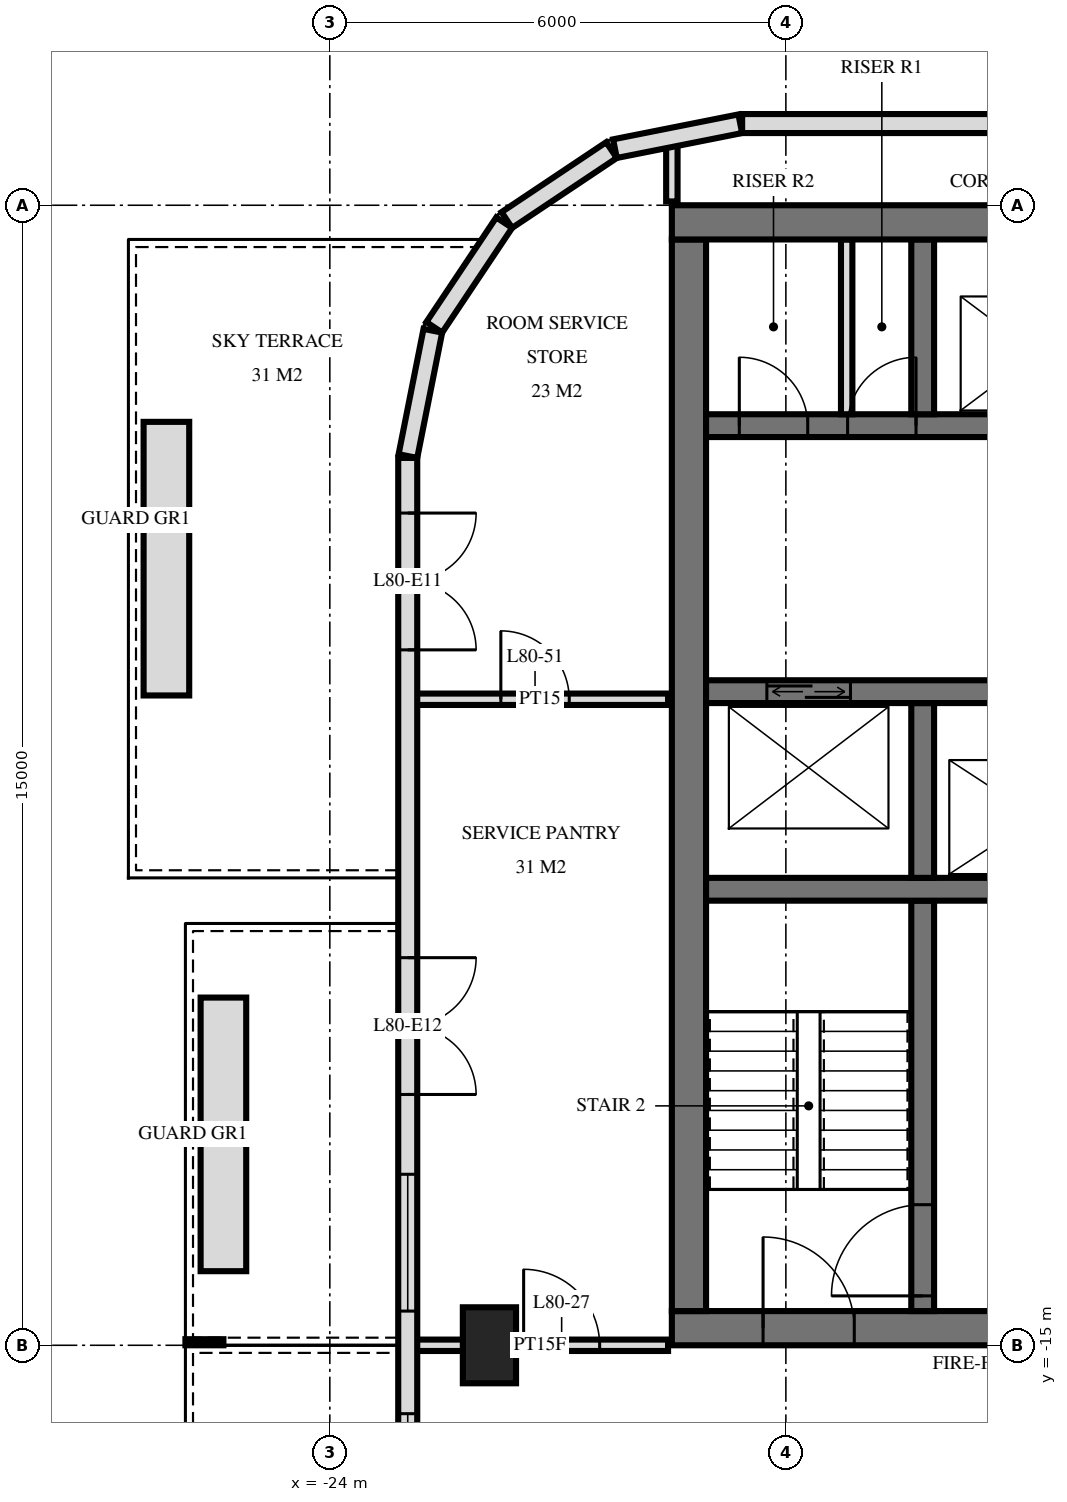
"""IFC4 building model, lengths in metres.
Left out: names, types, materials, properties, quantities, classifications, styles, units other than length and angle.
Written with IfcOpenShell. Run it as: python <this file> out.ifc"""

import sys

from ifc_helpers import new_model, si_unit, direction, frame, frame_2d, origin, origin_2d, place, context, subcontext, project, spatial, rectangle, extrude, element, fill, save


model = new_model("IFC4")
c1 = context("Model", 3, precision=1e-05, world=origin(), true_north=direction((0.0, 1.0)))
c2 = subcontext(c1, "Body", "Model", "MODEL_VIEW")
j1 = project(units=[si_unit("LENGTHUNIT", "METRE"), si_unit("PLANEANGLEUNIT", "RADIAN")], contexts=[c1])
p1 = place(None, origin())
s1 = spatial("IfcSite", under=j1, at=p1, CompositionType="ELEMENT")
p2 = place(p1, origin())
s2 = spatial("IfcBuilding", under=s1, at=p2, CompositionType="ELEMENT")
p3 = place(p2, frame((0.0, 0.0, 301.6)))
s3 = spatial("IfcBuildingStorey", under=s2, at=p3, CompositionType="ELEMENT", Elevation=301.6)
p4 = place(p3, frame((-21.9, -15.0, 0.0), z_axis=(0.0, 0.0, 1.0), x_axis=(0.0, 1.0, 0.0)))
e1 = element("IfcColumn", 1, at=p4, inside=s3, PredefinedType="COLUMN", context=c2, shape_type="SweptSolid", body=[
    extrude(rectangle(XDim=1.0, YDim=0.7, at=origin_2d()), origin(), (0.0, 0.0, 1.0), 3.5),
])
p5 = place(p3, frame((-19.5, -0.225, 0.0), z_axis=(0.0, 0.0, 1.0), x_axis=(1.0, 0.0, 0.0)))
e2 = element("IfcWall", 2, at=p5, inside=s3, PredefinedType="SHEAR", context=c2, shape_type="SweptSolid", body=[
    extrude(rectangle(XDim=9.5, YDim=0.45, at=frame_2d((4.75, 0.0))), origin(), (0.0, 0.0, 1.0), 3.5),
])
p6 = place(p3, frame((-19.5, -14.775, 0.0), z_axis=(0.0, 0.0, 1.0), x_axis=(1.0, 0.0, 0.0)))
e3 = element("IfcWall", 3, at=p6, inside=s3, PredefinedType="SHEAR", context=c2, shape_type="SweptSolid", body=[
    extrude(rectangle(XDim=9.5, YDim=0.45, at=frame_2d((4.75, 0.0))), origin(), (0.0, 0.0, 1.0), 3.5),
])
p7 = place(p6, frame((1.2, 0.0, 0.0)))
e4 = element("IfcOpeningElement", 4, at=p7, cuts=e3, PredefinedType="OPENING", context=c2, shape_type="SweptSolid", body=[
    extrude(rectangle(XDim=1.2, YDim=2.1, at=frame_2d((0.6, 1.05))), frame((0.0, 0.235, 0.0), z_axis=(0.0, -1.0, 0.0), x_axis=(1.0, 0.0, 0.0)), (0.0, 0.0, 1.0), 0.47),
])
p8 = place(p6, frame((4.25, 0.0, 0.0)))
e5 = element("IfcOpeningElement", 5, at=p8, cuts=e3, PredefinedType="OPENING", context=c2, shape_type="SweptSolid", body=[
    extrude(rectangle(XDim=1.1, YDim=2.1, at=frame_2d((0.55, 1.05))), frame((0.0, 0.235, 0.0), z_axis=(0.0, -1.0, 0.0), x_axis=(1.0, 0.0, 0.0)), (0.0, 0.0, 1.0), 0.47),
])
p9 = place(p3, frame((-19.275, -14.55, 0.0), z_axis=(0.0, 0.0, 1.0), x_axis=(0.0, 1.0, 0.0)))
e6 = element("IfcWall", 6, at=p9, inside=s3, PredefinedType="SHEAR", context=c2, shape_type="SweptSolid", body=[
    extrude(rectangle(XDim=14.1, YDim=0.45, at=frame_2d((7.05, 0.0))), origin(), (0.0, 0.0, 1.0), 3.5),
])
p10 = place(p3, frame((-19.05, -2.9, 0.0), z_axis=(0.0, 0.0, 1.0), x_axis=(1.0, 0.0, 0.0)))
e7 = element("IfcWall", 7, at=p10, inside=s3, PredefinedType="SHEAR", context=c2, shape_type="SweptSolid", body=[
    extrude(rectangle(XDim=8.7, YDim=0.3, at=frame_2d((4.35, 0.0))), origin(), (0.0, 0.0, 1.0), 3.5),
])
p11 = place(p10, frame((6.8, 0.0, 0.0)))
e8 = element("IfcOpeningElement", 8, at=p11, cuts=e7, PredefinedType="OPENING", context=c2, shape_type="SweptSolid", body=[
    extrude(rectangle(XDim=1.1, YDim=2.1, at=frame_2d((0.55, 1.05))), frame((0.0, 0.16, 0.0), z_axis=(0.0, -1.0, 0.0), x_axis=(1.0, 0.0, 0.0)), (0.0, 0.0, 1.0), 0.32),
])
p12 = place(p10, frame((3.8, 0.0, 0.0)))
e9 = element("IfcOpeningElement", 9, at=p12, cuts=e7, PredefinedType="OPENING", context=c2, shape_type="SweptSolid", body=[
    extrude(rectangle(XDim=1.1, YDim=2.1, at=frame_2d((0.55, 1.05))), frame((0.0, 0.16, 0.0), z_axis=(0.0, -1.0, 0.0), x_axis=(1.0, 0.0, 0.0)), (0.0, 0.0, 1.0), 0.32),
])
p13 = place(p10, frame((1.863, 0.0, 0.0)))
e10 = element("IfcOpeningElement", 10, at=p13, cuts=e7, PredefinedType="OPENING", context=c2, shape_type="SweptSolid", body=[
    extrude(rectangle(XDim=0.9, YDim=2.1, at=frame_2d((0.45, 1.05))), frame((0.0, 0.16, 0.0), z_axis=(0.0, -1.0, 0.0), x_axis=(1.0, 0.0, 0.0)), (0.0, 0.0, 1.0), 0.32),
])
p14 = place(p10, frame((0.438, 0.0, 0.0)))
e11 = element("IfcOpeningElement", 11, at=p14, cuts=e7, PredefinedType="OPENING", context=c2, shape_type="SweptSolid", body=[
    extrude(rectangle(XDim=0.9, YDim=2.1, at=frame_2d((0.45, 1.05))), frame((0.0, 0.16, 0.0), z_axis=(0.0, -1.0, 0.0), x_axis=(1.0, 0.0, 0.0)), (0.0, 0.0, 1.0), 0.32),
])
p15 = place(p3, frame((-19.05, -6.4, 0.0), z_axis=(0.0, 0.0, 1.0), x_axis=(1.0, 0.0, 0.0)))
e12 = element("IfcWall", 12, at=p15, inside=s3, PredefinedType="SHEAR", context=c2, shape_type="SweptSolid", body=[
    extrude(rectangle(XDim=8.7, YDim=0.3, at=frame_2d((4.35, 0.0))), origin(), (0.0, 0.0, 1.0), 3.5),
])
p16 = place(p15, frame((0.8, 0.0, 0.0)))
e13 = element("IfcOpeningElement", 13, at=p16, cuts=e12, PredefinedType="OPENING", context=c2, shape_type="SweptSolid", body=[
    extrude(rectangle(XDim=1.1, YDim=2.1, at=frame_2d((0.55, 1.05))), frame((0.0, 0.16, 0.0), z_axis=(0.0, -1.0, 0.0), x_axis=(1.0, 0.0, 0.0)), (0.0, 0.0, 1.0), 0.32),
])
p17 = place(p3, frame((-19.05, -9.0, 0.0), z_axis=(0.0, 0.0, 1.0), x_axis=(1.0, 0.0, 0.0)))
e14 = element("IfcWall", 14, at=p17, inside=s3, PredefinedType="SHEAR", context=c2, shape_type="SweptSolid", body=[
    extrude(rectangle(XDim=8.7, YDim=0.3, at=frame_2d((4.35, 0.0))), origin(), (0.0, 0.0, 1.0), 3.5),
])
p18 = place(p17, frame((3.8, 0.0, 0.0)))
e15 = element("IfcOpeningElement", 15, at=p18, cuts=e14, PredefinedType="OPENING", context=c2, shape_type="SweptSolid", body=[
    extrude(rectangle(XDim=1.1, YDim=2.1, at=frame_2d((0.55, 1.05))), frame((0.0, 0.16, 0.0), z_axis=(0.0, -1.0, 0.0), x_axis=(1.0, 0.0, 0.0)), (0.0, 0.0, 1.0), 0.32),
])
for number, where, z_axis, x_axis in (
    (16, (-16.2, -2.75, 0.0), (0.0, 0.0, 1.0), (0.0, 1.0, 0.0)),
    (17, (-16.2, -8.85, 0.0), (0.0, 0.0, 1.0), (0.0, 1.0, 0.0)),
):
    element("IfcWall", number, at=place(p3, frame(where, z_axis=z_axis, x_axis=x_axis)), inside=s3, PredefinedType="SHEAR", context=c2, shape_type="SweptSolid", body=[
        extrude(rectangle(XDim=2.3, YDim=0.3, at=frame_2d((1.15, 0.0))), origin(), (0.0, 0.0, 1.0), 3.5),
    ])
p19 = place(p3, frame((-16.2, -14.55, 0.0), z_axis=(0.0, 0.0, 1.0), x_axis=(0.0, 1.0, 0.0)))
e18 = element("IfcWall", 18, at=p19, inside=s3, PredefinedType="SHEAR", context=c2, shape_type="SweptSolid", body=[
    extrude(rectangle(XDim=5.4, YDim=0.3, at=frame_2d((2.7, 0.0))), origin(), (0.0, 0.0, 1.0), 3.5),
])
p20 = place(p19, frame((0.2, 0.0, 0.0)))
e19 = element("IfcOpeningElement", 19, at=p20, cuts=e18, PredefinedType="OPENING", context=c2, shape_type="SweptSolid", body=[
    extrude(rectangle(XDim=1.2, YDim=2.1, at=frame_2d((0.6, 1.05))), frame((0.0, 0.16, 0.0), z_axis=(0.0, -1.0, 0.0), x_axis=(1.0, 0.0, 0.0)), (0.0, 0.0, 1.0), 0.32),
])
p21 = place(p3, frame((18.575, 1.075, 0.0), z_axis=(0.0, 0.0, 1.0), x_axis=(-1.0, 0.0, 0.0)))
e20 = element("IfcWall", 20, at=p21, inside=s3, PredefinedType="SOLIDWALL", context=c2, shape_type="SweptSolid", body=[
    extrude(rectangle(XDim=37.151, YDim=0.25, at=frame_2d((18.575, 0.0))), origin(), (0.0, 0.0, 1.0), 3.22),
])
p22 = place(p21, frame((9.275, 0.0, 0.9)))
e21 = element("IfcOpeningElement", 21, at=p22, cuts=e20, PredefinedType="OPENING", context=c2, shape_type="SweptSolid", body=[
    extrude(rectangle(XDim=2.4, YDim=1.5, at=frame_2d((1.2, 0.75))), frame((0.0, 0.135, 0.0), z_axis=(0.0, -1.0, 0.0), x_axis=(1.0, 0.0, 0.0)), (0.0, 0.0, 1.0), 0.27),
])
p23 = place(p21, frame((12.275, 0.0, 0.9)))
e22 = element("IfcOpeningElement", 22, at=p23, cuts=e20, PredefinedType="OPENING", context=c2, shape_type="SweptSolid", body=[
    extrude(rectangle(XDim=2.4, YDim=1.5, at=frame_2d((1.2, 0.75))), frame((0.0, 0.135, 0.0), z_axis=(0.0, -1.0, 0.0), x_axis=(1.0, 0.0, 0.0)), (0.0, 0.0, 1.0), 0.27),
])
p24 = place(p21, frame((15.275, 0.0, 0.9)))
e23 = element("IfcOpeningElement", 23, at=p24, cuts=e20, PredefinedType="OPENING", context=c2, shape_type="SweptSolid", body=[
    extrude(rectangle(XDim=2.4, YDim=1.5, at=frame_2d((1.2, 0.75))), frame((0.0, 0.135, 0.0), z_axis=(0.0, -1.0, 0.0), x_axis=(1.0, 0.0, 0.0)), (0.0, 0.0, 1.0), 0.27),
])
p25 = place(p21, frame((25.375, 0.0, 0.9)))
e24 = element("IfcOpeningElement", 24, at=p25, cuts=e20, PredefinedType="OPENING", context=c2, shape_type="SweptSolid", body=[
    extrude(rectangle(XDim=2.4, YDim=1.5, at=frame_2d((1.2, 0.75))), frame((0.0, 0.135, 0.0), z_axis=(0.0, -1.0, 0.0), x_axis=(1.0, 0.0, 0.0)), (0.0, 0.0, 1.0), 0.27),
])
p26 = place(p3, frame((-18.6, 1.073, 0.0), z_axis=(0.0, 0.0, 1.0), x_axis=(-0.980797896849, -0.195026884138, 0.0)))
e25 = element("IfcWall", 25, at=p26, inside=s3, PredefinedType="SOLIDWALL", context=c2, shape_type="SweptSolid", body=[
    extrude(rectangle(XDim=1.681, YDim=0.25, at=frame_2d((0.841, 0.0))), origin(), (0.0, 0.0, 1.0), 3.22),
])
for number, where, z_axis, x_axis in (
    (26, (-20.294, 0.726, 0.0), (0.0, 0.0, 1.0), (-0.831, -0.556, 0.0)),
    (27, (-21.706, -0.229, 0.0), (0.0, 0.0, 1.0), (-0.556, -0.831, 0.0)),
):
    element("IfcWall", number, at=place(p3, frame(where, z_axis=z_axis, x_axis=x_axis)), inside=s3, PredefinedType="SOLIDWALL", context=c2, shape_type="SweptSolid", body=[
        extrude(rectangle(XDim=1.656, YDim=0.25, at=frame_2d((0.828, 0.0))), origin(), (0.0, 0.0, 1.0), 3.22),
    ])
p27 = place(p3, frame((-22.645, -1.651, 0.0), z_axis=(0.0, 0.0, 1.0), x_axis=(-0.19513878023, -0.980775640221, 0.0)))
e28 = element("IfcWall", 28, at=p27, inside=s3, PredefinedType="SOLIDWALL", context=c2, shape_type="SweptSolid", body=[
    extrude(rectangle(XDim=1.681, YDim=0.25, at=frame_2d((0.841, 0.0))), origin(), (0.0, 0.0, 1.0), 3.22),
])
p28 = place(p3, frame((-22.975, -3.325, 0.0), z_axis=(0.0, 0.0, 1.0), x_axis=(0.0, -1.0, 0.0)))
e29 = element("IfcWall", 29, at=p28, inside=s3, PredefinedType="SOLIDWALL", context=c2, shape_type="SweptSolid", body=[
    extrude(rectangle(XDim=25.951, YDim=0.25, at=frame_2d((12.975, 0.0))), origin(), (0.0, 0.0, 1.0), 3.22),
])
p29 = place(p28, frame((0.725, 0.0, 0.0)))
e30 = element("IfcOpeningElement", 30, at=p29, cuts=e29, PredefinedType="OPENING", context=c2, shape_type="SweptSolid", body=[
    extrude(rectangle(XDim=1.8, YDim=2.4, at=frame_2d((0.9, 1.2))), frame((0.0, 0.135, 0.0), z_axis=(0.0, -1.0, 0.0), x_axis=(1.0, 0.0, 0.0)), (0.0, 0.0, 1.0), 0.27),
])
p30 = place(p28, frame((6.575, 0.0, 0.0)))
e31 = element("IfcOpeningElement", 31, at=p30, cuts=e29, PredefinedType="OPENING", context=c2, shape_type="SweptSolid", body=[
    extrude(rectangle(XDim=1.8, YDim=2.4, at=frame_2d((0.9, 1.2))), frame((0.0, 0.135, 0.0), z_axis=(0.0, -1.0, 0.0), x_axis=(1.0, 0.0, 0.0)), (0.0, 0.0, 1.0), 0.27),
])
p31 = place(p28, frame((9.425, 0.0, 0.9)))
e32 = element("IfcOpeningElement", 32, at=p31, cuts=e29, PredefinedType="OPENING", context=c2, shape_type="SweptSolid", body=[
    extrude(rectangle(XDim=1.8, YDim=1.5, at=frame_2d((0.9, 0.75))), frame((0.0, 0.135, 0.0), z_axis=(0.0, -1.0, 0.0), x_axis=(1.0, 0.0, 0.0)), (0.0, 0.0, 1.0), 0.27),
])
p32 = place(p28, frame((12.575, 0.0, 0.9)))
e33 = element("IfcOpeningElement", 33, at=p32, cuts=e29, PredefinedType="OPENING", context=c2, shape_type="SweptSolid", body=[
    extrude(rectangle(XDim=1.2, YDim=1.5, at=frame_2d((0.6, 0.75))), frame((0.0, 0.135, 0.0), z_axis=(0.0, -1.0, 0.0), x_axis=(1.0, 0.0, 0.0)), (0.0, 0.0, 1.0), 0.27),
])
p33 = place(p28, frame((16.7, 0.0, 0.0)))
e34 = element("IfcOpeningElement", 34, at=p33, cuts=e29, PredefinedType="OPENING", context=c2, shape_type="SweptSolid", body=[
    extrude(rectangle(XDim=1.8, YDim=2.4, at=frame_2d((0.9, 1.2))), frame((0.0, 0.135, 0.0), z_axis=(0.0, -1.0, 0.0), x_axis=(1.0, 0.0, 0.0)), (0.0, 0.0, 1.0), 0.27),
])
p34 = place(p28, frame((22.25, 0.0, 0.0)))
e35 = element("IfcOpeningElement", 35, at=p34, cuts=e29, PredefinedType="OPENING", context=c2, shape_type="SweptSolid", body=[
    extrude(rectangle(XDim=1.8, YDim=2.4, at=frame_2d((0.9, 1.2))), frame((0.0, 0.135, 0.0), z_axis=(0.0, -1.0, 0.0), x_axis=(1.0, 0.0, 0.0)), (0.0, 0.0, 1.0), 0.27),
])
for number, where, z_axis, x_axis in (
    (36, (-25.4, -14.025, 0.0), (0.0, 0.0, 1.0), (0.0, 1.0, 0.0)),
    (37, (-26.15, -6.45, 0.0), (0.0, 0.0, 1.0), (0.0, 1.0, 0.0)),
):
    element("IfcWall", number, at=place(p3, frame(where, z_axis=z_axis, x_axis=x_axis)), inside=s3, PredefinedType="USERDEFINED", context=c2, shape_type="SweptSolid", body=[
        extrude(rectangle(XDim=3.6, YDim=0.6, at=frame_2d((1.8, 0.0))), origin(), (0.0, 0.0, 1.0), 0.65),
    ])
p35 = place(p3, frame((-17.2, -2.75, 0.0), z_axis=(0.0, 0.0, 1.0), x_axis=(0.0, 1.0, 0.0)))
e38 = element("IfcWall", 38, at=p35, inside=s3, PredefinedType="PARTITIONING", context=c2, shape_type="SweptSolid", body=[
    extrude(rectangle(XDim=2.3, YDim=0.15, at=frame_2d((1.15, 0.0))), origin(), (0.0, 0.0, 1.0), 3.2),
])
p36 = place(p3, frame((-19.5, 0.05, 0.0), z_axis=(0.0, 0.0, 1.0), x_axis=(0.0, 1.0, 0.0)))
e39 = element("IfcWall", 39, at=p36, inside=s3, PredefinedType="PARTITIONING", context=c2, shape_type="SweptSolid", body=[
    extrude(rectangle(XDim=0.787, YDim=0.15, at=frame_2d((0.394, 0.0))), origin(), (0.0, 0.0, 1.0), 3.22),
])
p37 = place(p3, frame((-22.92, -15.0, 0.0), z_axis=(0.0, 0.0, 1.0), x_axis=(1.0, 0.0, 0.0)))
e40 = element("IfcWall", 40, at=p37, inside=s3, PredefinedType="PARTITIONING", context=c2, shape_type="SweptSolid", body=[
    extrude(rectangle(XDim=3.37, YDim=0.15, at=frame_2d((1.685, 0.0))), origin(), (0.0, 0.0, 1.0), 3.22),
])
p38 = place(p37, frame((1.47, 0.0, 0.0)))
e41 = element("IfcOpeningElement", 41, at=p38, cuts=e40, PredefinedType="OPENING", context=c2, shape_type="SweptSolid", body=[
    extrude(rectangle(XDim=1.0, YDim=2.1, at=frame_2d((0.5, 1.05))), frame((0.0, 0.085, 0.0), z_axis=(0.0, -1.0, 0.0), x_axis=(1.0, 0.0, 0.0)), (0.0, 0.0, 1.0), 0.17),
])
p39 = place(p3, frame((-22.92, -6.5, 0.0), z_axis=(0.0, 0.0, 1.0), x_axis=(1.0, 0.0, 0.0)))
e42 = element("IfcWall", 42, at=p39, inside=s3, PredefinedType="PARTITIONING", context=c2, shape_type="SweptSolid", body=[
    extrude(rectangle(XDim=3.37, YDim=0.15, at=frame_2d((1.685, 0.0))), origin(), (0.0, 0.0, 1.0), 3.22),
])
p40 = place(p39, frame((1.17, 0.0, 0.0)))
e43 = element("IfcOpeningElement", 43, at=p40, cuts=e42, PredefinedType="OPENING", context=c2, shape_type="SweptSolid", body=[
    extrude(rectangle(XDim=0.9, YDim=2.1, at=frame_2d((0.45, 1.05))), frame((0.0, 0.085, 0.0), z_axis=(0.0, -1.0, 0.0), x_axis=(1.0, 0.0, 0.0)), (0.0, 0.0, 1.0), 0.17),
])
p41 = place(p29, origin())
e44 = element("IfcDoor", 44, at=p41, inside=s3, OperationType="DOUBLE_DOOR_SINGLE_SWING", PredefinedType="DOOR", context=c2, shape_type="SweptSolid", body=[
    extrude(rectangle(XDim=1.8, YDim=2.4, at=frame_2d((0.9, 1.2))), frame((0.0, 0.025, 0.0), z_axis=(0.0, -1.0, 0.0), x_axis=(1.0, 0.0, 0.0)), (0.0, 0.0, 1.0), 0.05),
])
fill(e30, e44)
p42 = place(p30, origin())
e45 = element("IfcDoor", 45, at=p42, inside=s3, OperationType="DOUBLE_DOOR_SINGLE_SWING", PredefinedType="DOOR", context=c2, shape_type="SweptSolid", body=[
    extrude(rectangle(XDim=1.8, YDim=2.4, at=frame_2d((0.9, 1.2))), frame((0.0, 0.025, 0.0), z_axis=(0.0, -1.0, 0.0), x_axis=(1.0, 0.0, 0.0)), (0.0, 0.0, 1.0), 0.05),
])
fill(e31, e45)
p43 = place(p31, origin())
e46 = element("IfcWindow", 46, at=p43, inside=s3, PartitioningType="SINGLE_PANEL", PredefinedType="WINDOW", context=c2, shape_type="SweptSolid", body=[
    extrude(rectangle(XDim=1.8, YDim=1.5, at=frame_2d((0.9, 0.75))), frame((0.0, 0.03, 0.0), z_axis=(0.0, -1.0, 0.0), x_axis=(1.0, 0.0, 0.0)), (0.0, 0.0, 1.0), 0.06),
])
fill(e32, e46)
p44 = place(p32, origin())
e47 = element("IfcWindow", 47, at=p44, inside=s3, PartitioningType="SINGLE_PANEL", PredefinedType="WINDOW", context=c2, shape_type="SweptSolid", body=[
    extrude(rectangle(XDim=1.2, YDim=1.5, at=frame_2d((0.6, 0.75))), frame((0.0, 0.03, 0.0), z_axis=(0.0, -1.0, 0.0), x_axis=(1.0, 0.0, 0.0)), (0.0, 0.0, 1.0), 0.06),
])
fill(e33, e47)
p45 = place(p16, origin())
e48 = element("IfcDoor", 48, at=p45, inside=s3, OperationType="DOUBLE_DOOR_SLIDING", PredefinedType="USERDEFINED", context=c2, shape_type="SweptSolid", body=[
    extrude(rectangle(XDim=1.1, YDim=2.1, at=frame_2d((0.55, 1.05))), frame((0.0, 0.025, 0.0), z_axis=(0.0, -1.0, 0.0), x_axis=(1.0, 0.0, 0.0)), (0.0, 0.0, 1.0), 0.05),
])
fill(e13, e48)
p46 = place(p7, origin())
e49 = element("IfcDoor", 49, at=p46, inside=s3, OperationType="SINGLE_SWING_RIGHT", PredefinedType="DOOR", context=c2, shape_type="SweptSolid", body=[
    extrude(rectangle(XDim=1.2, YDim=2.1, at=frame_2d((0.6, 1.05))), frame((0.0, 0.025, 0.0), z_axis=(0.0, -1.0, 0.0), x_axis=(1.0, 0.0, 0.0)), (0.0, 0.0, 1.0), 0.05),
])
fill(e4, e49)
p47 = place(p13, origin())
e50 = element("IfcDoor", 50, at=p47, inside=s3, OperationType="SINGLE_SWING_LEFT", PredefinedType="DOOR", context=c2, shape_type="SweptSolid", body=[
    extrude(rectangle(XDim=0.9, YDim=2.1, at=frame_2d((0.45, 1.05))), frame((0.0, 0.025, 0.0), z_axis=(0.0, -1.0, 0.0), x_axis=(1.0, 0.0, 0.0)), (0.0, 0.0, 1.0), 0.05),
])
fill(e10, e50)
p48 = place(p14, origin())
e51 = element("IfcDoor", 51, at=p48, inside=s3, OperationType="SINGLE_SWING_RIGHT", PredefinedType="DOOR", context=c2, shape_type="SweptSolid", body=[
    extrude(rectangle(XDim=0.9, YDim=2.1, at=frame_2d((0.45, 1.05))), frame((0.0, 0.025, 0.0), z_axis=(0.0, -1.0, 0.0), x_axis=(1.0, 0.0, 0.0)), (0.0, 0.0, 1.0), 0.05),
])
fill(e11, e51)
p49 = place(p20, origin())
e52 = element("IfcDoor", 52, at=p49, inside=s3, OperationType="SINGLE_SWING_RIGHT", PredefinedType="DOOR", context=c2, shape_type="SweptSolid", body=[
    extrude(rectangle(XDim=1.2, YDim=2.1, at=frame_2d((0.6, 1.05))), frame((0.0, 0.025, 0.0), z_axis=(0.0, -1.0, 0.0), x_axis=(1.0, 0.0, 0.0)), (0.0, 0.0, 1.0), 0.05),
])
fill(e19, e52)
p50 = place(p38, origin())
e53 = element("IfcDoor", 53, at=p50, inside=s3, OperationType="SINGLE_SWING_RIGHT", PredefinedType="DOOR", context=c2, shape_type="SweptSolid", body=[
    extrude(rectangle(XDim=1.0, YDim=2.1, at=frame_2d((0.5, 1.05))), frame((0.0, 0.025, 0.0), z_axis=(0.0, -1.0, 0.0), x_axis=(1.0, 0.0, 0.0)), (0.0, 0.0, 1.0), 0.05),
])
fill(e41, e53)
p51 = place(p40, origin())
e54 = element("IfcDoor", 54, at=p51, inside=s3, OperationType="SINGLE_SWING_RIGHT", PredefinedType="DOOR", context=c2, shape_type="SweptSolid", body=[
    extrude(rectangle(XDim=0.9, YDim=2.1, at=frame_2d((0.45, 1.05))), frame((0.0, 0.025, 0.0), z_axis=(0.0, -1.0, 0.0), x_axis=(1.0, 0.0, 0.0)), (0.0, 0.0, 1.0), 0.05),
])
fill(e43, e54)
save(model, sys.argv[1])
